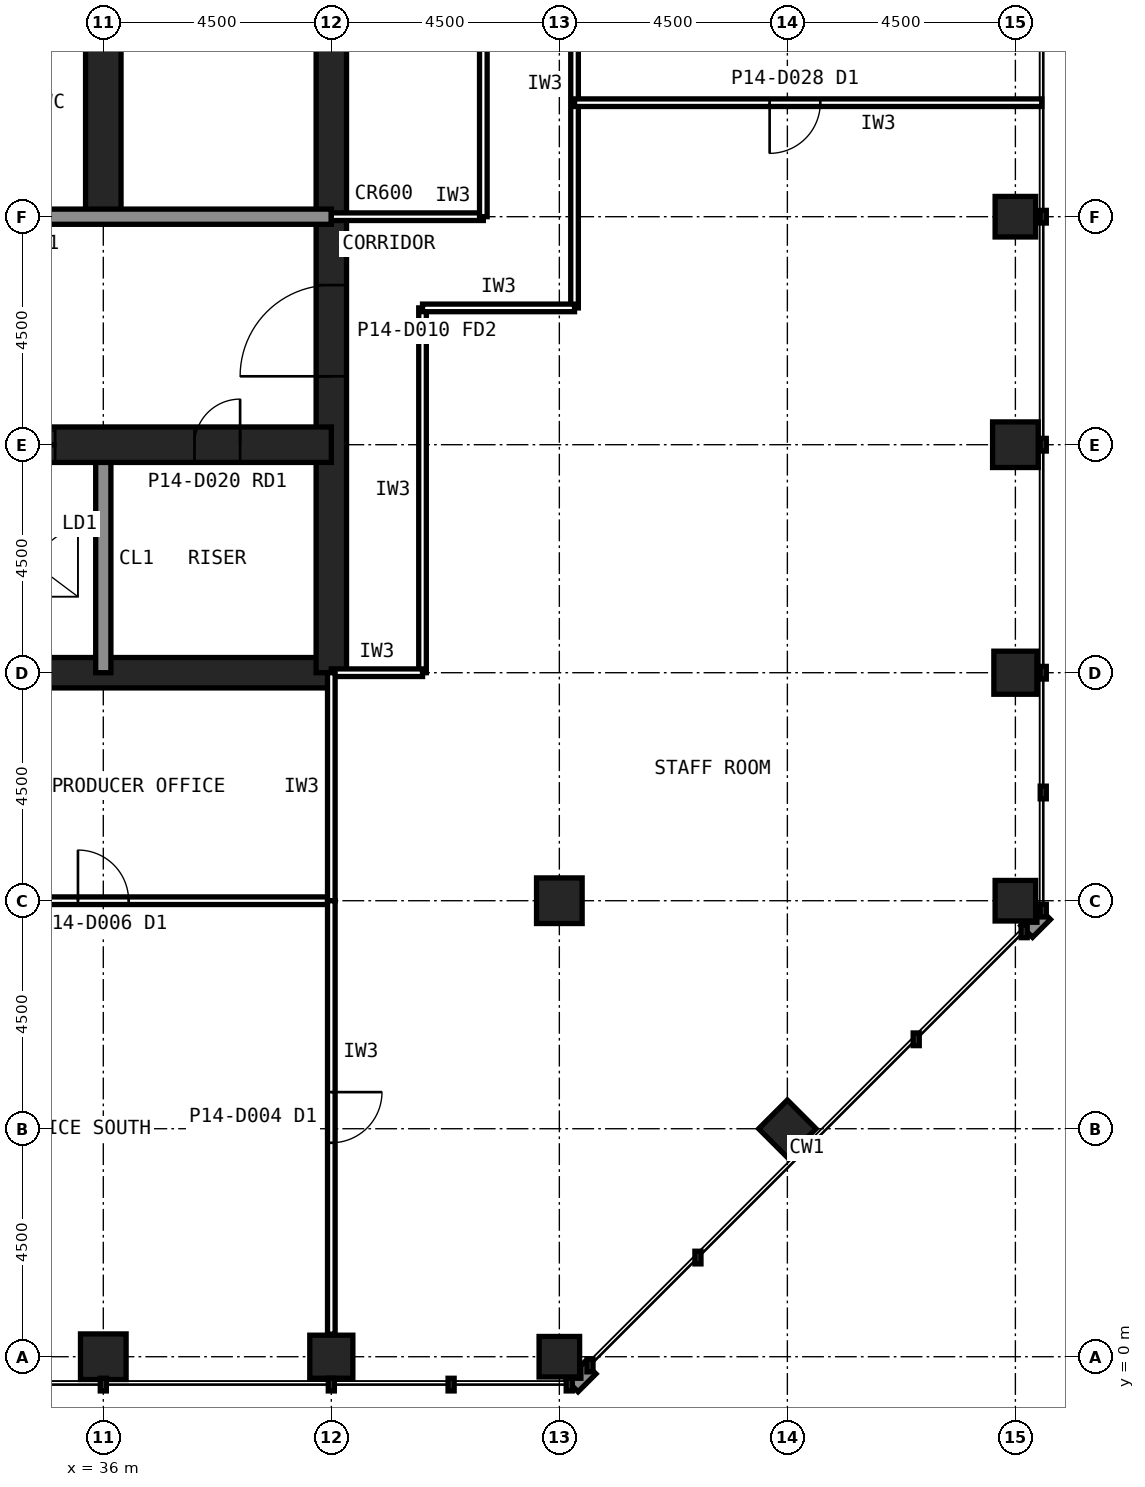
"""IFC4 building model, lengths in metres.
Left out: names, types, materials, properties, quantities, classifications, styles, units other than length and angle.
Written with IfcOpenShell. Run it as: python <this file> out.ifc"""

import sys

from ifc_helpers import new_model, si_unit, direction, frame, frame_2d, origin, origin_2d, place, context, subcontext, project, spatial, rectangle, hollow_rectangle, extrude, element, fill, save


model = new_model("IFC4")
c1 = context("Model", 3, precision=1e-05, world=origin(), true_north=direction((0.0, 1.0)))
c2 = subcontext(c1, "Body", "Model", "MODEL_VIEW")
j1 = project(units=[si_unit("LENGTHUNIT", "METRE"), si_unit("PLANEANGLEUNIT", "RADIAN")], contexts=[c1])
p1 = place(None, origin())
s1 = spatial("IfcSite", under=j1, at=p1, CompositionType="ELEMENT")
p2 = place(p1, origin())
s2 = spatial("IfcBuilding", under=s1, at=p2, CompositionType="ELEMENT")
p3 = place(p2, frame((0.0, 0.0, 62.6)))
s3 = spatial("IfcBuildingStorey", under=s2, at=p3, CompositionType="ELEMENT", Elevation=62.6)
p4 = place(p3, frame((36.0, 0.0, 0.0), z_axis=(0.0, 0.0, 1.0), x_axis=(1.0, 0.0, 0.0)))
e1 = element("IfcColumn", 1, at=p4, inside=s3, PredefinedType="COLUMN", context=c2, shape_type="SweptSolid", body=[
    extrude(hollow_rectangle(XDim=0.9, YDim=0.9, WallThickness=0.063, at=origin_2d()), origin(), (0.0, 0.0, 1.0), 4.2),
])
p5 = place(p3, frame((40.5, 0.0, 0.0), z_axis=(0.0, 0.0, 1.0), x_axis=(1.0, 0.0, 0.0)))
e2 = element("IfcColumn", 2, at=p5, inside=s3, PredefinedType="COLUMN", context=c2, shape_type="SweptSolid", body=[
    extrude(hollow_rectangle(XDim=0.85, YDim=0.85, WallThickness=0.05, at=origin_2d()), origin(), (0.0, 0.0, 1.0), 4.2),
])
for number, where, z_axis, x_axis in (
    (3, (45.0, 0.0, 0.0), (0.0, 0.0, 1.0), (1.0, 0.0, 0.0)),
    (4, (54.0, 9.0, 0.0), (0.0, 0.0, 1.0), (1.0, 0.0, 0.0)),
):
    element("IfcColumn", number, at=place(p3, frame(where, z_axis=z_axis, x_axis=x_axis)), inside=s3, PredefinedType="COLUMN", context=c2, shape_type="SweptSolid", body=[
        extrude(hollow_rectangle(XDim=0.8, YDim=0.8, WallThickness=0.045, at=origin_2d()), origin(), (0.0, 0.0, 1.0), 4.2),
    ])
p6 = place(p3, frame((54.0, 13.5, 0.0), z_axis=(0.0, 0.0, 1.0), x_axis=(1.0, 0.0, 0.0)))
e5 = element("IfcColumn", 5, at=p6, inside=s3, PredefinedType="COLUMN", context=c2, shape_type="SweptSolid", body=[
    extrude(hollow_rectangle(XDim=0.85, YDim=0.85, WallThickness=0.05, at=origin_2d()), origin(), (0.0, 0.0, 1.0), 4.2),
])
p7 = place(p3, frame((54.0, 18.0, 0.0), z_axis=(0.0, 0.0, 1.0), x_axis=(1.0, 0.0, 0.0)))
e6 = element("IfcColumn", 6, at=p7, inside=s3, PredefinedType="COLUMN", context=c2, shape_type="SweptSolid", body=[
    extrude(hollow_rectangle(XDim=0.9, YDim=0.9, WallThickness=0.063, at=origin_2d()), origin(), (0.0, 0.0, 1.0), 4.2),
])
for number, where, z_axis, x_axis in (
    (7, (54.0, 22.5, 0.0), (0.0, 0.0, 1.0), (1.0, 0.0, 0.0)),
    (8, (49.5, 4.5, 0.0), (0.0, 0.0, 1.0), (0.707, 0.707, 0.0)),
):
    element("IfcColumn", number, at=place(p3, frame(where, z_axis=z_axis, x_axis=x_axis)), inside=s3, PredefinedType="COLUMN", context=c2, shape_type="SweptSolid", body=[
        extrude(hollow_rectangle(XDim=0.8, YDim=0.8, WallThickness=0.045, at=origin_2d()), origin(), (0.0, 0.0, 1.0), 4.2),
    ])
p8 = place(p3, frame((45.0, 9.0, 0.0), z_axis=(0.0, 0.0, 1.0), x_axis=(1.0, 0.0, 0.0)))
e9 = element("IfcColumn", 9, at=p8, inside=s3, PredefinedType="COLUMN", context=c2, shape_type="SweptSolid", body=[
    extrude(hollow_rectangle(XDim=0.9, YDim=0.9, WallThickness=0.063, at=origin_2d()), origin(), (0.0, 0.0, 1.0), 4.2),
])
p9 = place(p3, frame((13.5, 13.5, 0.0), z_axis=(0.0, 0.0, 1.0), x_axis=(1.0, 0.0, 0.0)))
e10 = element("IfcWall", 10, at=p9, inside=s3, PredefinedType="SHEAR", context=c2, shape_type="SweptSolid", body=[
    extrude(rectangle(XDim=27.0, YDim=0.6, at=frame_2d((13.5, 0.0))), origin(), (0.0, 0.0, 1.0), 4.2),
])
p10 = place(p3, frame((40.5, 13.5, 0.0), z_axis=(0.0, 0.0, 1.0), x_axis=(0.0, 1.0, 0.0)))
e11 = element("IfcWall", 11, at=p10, inside=s3, PredefinedType="SHEAR", context=c2, shape_type="SweptSolid", body=[
    extrude(rectangle(XDim=27.0, YDim=0.6, at=frame_2d((13.5, 0.0))), origin(), (0.0, 0.0, 1.0), 4.2),
])
p11 = place(p10, frame((5.85, 0.0, 0.0)))
e12 = element("IfcOpeningElement", 12, at=p11, cuts=e11, PredefinedType="OPENING", context=c2, shape_type="SweptSolid", body=[
    extrude(rectangle(XDim=1.8, YDim=2.1, at=frame_2d((0.9, 1.05))), frame((0.0, 0.31, 0.0), z_axis=(0.0, -1.0, 0.0), x_axis=(1.0, 0.0, 0.0)), (0.0, 0.0, 1.0), 0.62),
])
p12 = place(p10, frame((19.65, 0.0, 0.0)))
e13 = element("IfcOpeningElement", 13, at=p12, cuts=e11, PredefinedType="OPENING", context=c2, shape_type="SweptSolid", body=[
    extrude(rectangle(XDim=1.2, YDim=2.1, at=frame_2d((0.6, 1.05))), frame((0.0, 0.31, 0.0), z_axis=(0.0, -1.0, 0.0), x_axis=(1.0, 0.0, 0.0)), (0.0, 0.0, 1.0), 0.62),
])
p13 = place(p3, frame((36.0, 13.5, 0.0), z_axis=(0.0, 0.0, 1.0), x_axis=(0.0, 1.0, 0.0)))
e14 = element("IfcWall", 14, at=p13, inside=s3, PredefinedType="SOLIDWALL", context=c2, shape_type="SweptSolid", body=[
    extrude(rectangle(XDim=4.5, YDim=0.3, at=frame_2d((2.25, 0.0))), origin(), (0.0, 0.0, 1.0), 4.04),
])
p14 = place(p3, frame((36.0, 22.5, 0.0), z_axis=(0.0, 0.0, 1.0), x_axis=(0.0, 1.0, 0.0)))
e15 = element("IfcWall", 15, at=p14, inside=s3, PredefinedType="SHEAR", context=c2, shape_type="SweptSolid", body=[
    extrude(rectangle(XDim=18.0, YDim=0.7, at=frame_2d((9.0, 0.0))), origin(), (0.0, 0.0, 1.0), 4.2),
])
p15 = place(p3, frame((13.5, 18.0, 0.0), z_axis=(0.0, 0.0, 1.0), x_axis=(1.0, 0.0, 0.0)))
e16 = element("IfcWall", 16, at=p15, inside=s3, PredefinedType="SHEAR", context=c2, shape_type="SweptSolid", body=[
    extrude(rectangle(XDim=27.0, YDim=0.7, at=frame_2d((13.5, 0.0))), origin(), (0.0, 0.0, 1.0), 4.2),
])
p16 = place(p15, frame((24.3, 0.0, 0.0)))
e17 = element("IfcOpeningElement", 17, at=p16, cuts=e16, PredefinedType="OPENING", context=c2, shape_type="SweptSolid", body=[
    extrude(rectangle(XDim=0.9, YDim=2.1, at=frame_2d((0.45, 1.05))), frame((0.0, 0.36, 0.0), z_axis=(0.0, -1.0, 0.0), x_axis=(1.0, 0.0, 0.0)), (0.0, 0.0, 1.0), 0.72),
])
p17 = place(p15, frame((5.45, 0.0, 0.0)))
e18 = element("IfcOpeningElement", 18, at=p17, cuts=e16, PredefinedType="OPENING", context=c2, shape_type="SweptSolid", body=[
    extrude(rectangle(XDim=1.1, YDim=2.1, at=frame_2d((0.55, 1.05))), frame((0.0, 0.36, 0.0), z_axis=(0.0, -1.0, 0.0), x_axis=(1.0, 0.0, 0.0)), (0.0, 0.0, 1.0), 0.72),
])
p18 = place(p15, frame((8.45, 0.0, 0.0)))
e19 = element("IfcOpeningElement", 19, at=p18, cuts=e16, PredefinedType="OPENING", context=c2, shape_type="SweptSolid", body=[
    extrude(rectangle(XDim=1.1, YDim=2.1, at=frame_2d((0.55, 1.05))), frame((0.0, 0.36, 0.0), z_axis=(0.0, -1.0, 0.0), x_axis=(1.0, 0.0, 0.0)), (0.0, 0.0, 1.0), 0.72),
])
p19 = place(p15, frame((11.45, 0.0, 0.0)))
e20 = element("IfcOpeningElement", 20, at=p19, cuts=e16, PredefinedType="OPENING", context=c2, shape_type="SweptSolid", body=[
    extrude(rectangle(XDim=1.1, YDim=2.1, at=frame_2d((0.55, 1.05))), frame((0.0, 0.36, 0.0), z_axis=(0.0, -1.0, 0.0), x_axis=(1.0, 0.0, 0.0)), (0.0, 0.0, 1.0), 0.72),
])
p20 = place(p15, frame((14.45, 0.0, 0.0)))
e21 = element("IfcOpeningElement", 21, at=p20, cuts=e16, PredefinedType="OPENING", context=c2, shape_type="SweptSolid", body=[
    extrude(rectangle(XDim=1.1, YDim=2.1, at=frame_2d((0.55, 1.05))), frame((0.0, 0.36, 0.0), z_axis=(0.0, -1.0, 0.0), x_axis=(1.0, 0.0, 0.0)), (0.0, 0.0, 1.0), 0.72),
])
p21 = place(p15, frame((17.45, 0.0, 0.0)))
e22 = element("IfcOpeningElement", 22, at=p21, cuts=e16, PredefinedType="OPENING", context=c2, shape_type="SweptSolid", body=[
    extrude(rectangle(XDim=1.1, YDim=2.1, at=frame_2d((0.55, 1.05))), frame((0.0, 0.36, 0.0), z_axis=(0.0, -1.0, 0.0), x_axis=(1.0, 0.0, 0.0)), (0.0, 0.0, 1.0), 0.72),
])
p22 = place(p15, frame((20.45, 0.0, 0.0)))
e23 = element("IfcOpeningElement", 23, at=p22, cuts=e16, PredefinedType="OPENING", context=c2, shape_type="SweptSolid", body=[
    extrude(rectangle(XDim=1.1, YDim=2.1, at=frame_2d((0.55, 1.05))), frame((0.0, 0.36, 0.0), z_axis=(0.0, -1.0, 0.0), x_axis=(1.0, 0.0, 0.0)), (0.0, 0.0, 1.0), 0.72),
])
p23 = place(p15, frame((1.6, 0.0, 0.0)))
e24 = element("IfcOpeningElement", 24, at=p23, cuts=e16, PredefinedType="OPENING", context=c2, shape_type="SweptSolid", body=[
    extrude(rectangle(XDim=1.3, YDim=2.2, at=frame_2d((0.65, 1.1))), frame((0.0, 0.36, 0.0), z_axis=(0.0, -1.0, 0.0), x_axis=(1.0, 0.0, 0.0)), (0.0, 0.0, 1.0), 0.72),
])
p24 = place(p3, frame((13.5, 22.5, 0.0), z_axis=(0.0, 0.0, 1.0), x_axis=(1.0, 0.0, 0.0)))
e25 = element("IfcWall", 25, at=p24, inside=s3, PredefinedType="SOLIDWALL", context=c2, shape_type="SweptSolid", body=[
    extrude(rectangle(XDim=27.0, YDim=0.3, at=frame_2d((13.5, 0.0))), origin(), (0.0, 0.0, 1.0), 4.04),
])
p25 = place(p24, frame((1.65, 0.0, 0.0)))
e26 = element("IfcOpeningElement", 26, at=p25, cuts=e25, PredefinedType="OPENING", context=c2, shape_type="SweptSolid", body=[
    extrude(rectangle(XDim=1.2, YDim=2.1, at=frame_2d((0.6, 1.05))), frame((0.0, 0.16, 0.0), z_axis=(0.0, -1.0, 0.0), x_axis=(1.0, 0.0, 0.0)), (0.0, 0.0, 1.0), 0.32),
])
p26 = place(p24, frame((6.025, 0.0, 0.0)))
e27 = element("IfcOpeningElement", 27, at=p26, cuts=e25, PredefinedType="OPENING", context=c2, shape_type="SweptSolid", body=[
    extrude(rectangle(XDim=1.0, YDim=2.1, at=frame_2d((0.5, 1.05))), frame((0.0, 0.16, 0.0), z_axis=(0.0, -1.0, 0.0), x_axis=(1.0, 0.0, 0.0)), (0.0, 0.0, 1.0), 0.32),
])
p27 = place(p24, frame((10.525, 0.0, 0.0)))
e28 = element("IfcOpeningElement", 28, at=p27, cuts=e25, PredefinedType="OPENING", context=c2, shape_type="SweptSolid", body=[
    extrude(rectangle(XDim=1.0, YDim=2.1, at=frame_2d((0.5, 1.05))), frame((0.0, 0.16, 0.0), z_axis=(0.0, -1.0, 0.0), x_axis=(1.0, 0.0, 0.0)), (0.0, 0.0, 1.0), 0.32),
])
p28 = place(p24, frame((19.75, 0.0, 0.0)))
e29 = element("IfcOpeningElement", 29, at=p28, cuts=e25, PredefinedType="OPENING", context=c2, shape_type="SweptSolid", body=[
    extrude(rectangle(XDim=1.0, YDim=2.1, at=frame_2d((0.5, 1.05))), frame((0.0, 0.16, 0.0), z_axis=(0.0, -1.0, 0.0), x_axis=(1.0, 0.0, 0.0)), (0.0, 0.0, 1.0), 0.32),
])
p29 = place(p24, frame((15.05, 0.0, 0.0)))
e30 = element("IfcOpeningElement", 30, at=p29, cuts=e25, PredefinedType="OPENING", context=c2, shape_type="SweptSolid", body=[
    extrude(rectangle(XDim=1.4, YDim=2.4, at=frame_2d((0.7, 1.2))), frame((0.0, 0.16, 0.0), z_axis=(0.0, -1.0, 0.0), x_axis=(1.0, 0.0, 0.0)), (0.0, 0.0, 1.0), 0.32),
])
p30 = place(p3, frame((45.3, 20.7, 0.0), z_axis=(0.0, 0.0, 1.0), x_axis=(0.0, 1.0, 0.0)))
e31 = element("IfcWall", 31, at=p30, inside=s3, PredefinedType="PARTITIONING", context=c2, shape_type="SweptSolid", body=[
    extrude(rectangle(XDim=12.6, YDim=0.15, at=frame_2d((6.3, 0.0))), origin(), (0.0, 0.0, 1.0), 4.04),
])
p31 = place(p30, frame((5.8, 0.0, 0.0)))
e32 = element("IfcOpeningElement", 32, at=p31, cuts=e31, PredefinedType="OPENING", context=c2, shape_type="SweptSolid", body=[
    extrude(rectangle(XDim=1.0, YDim=2.1, at=frame_2d((0.5, 1.05))), frame((0.0, 0.085, 0.0), z_axis=(0.0, -1.0, 0.0), x_axis=(1.0, 0.0, 0.0)), (0.0, 0.0, 1.0), 0.17),
])
p32 = place(p3, frame((42.3, 13.5, 0.0), z_axis=(0.0, 0.0, 1.0), x_axis=(0.0, 1.0, 0.0)))
e33 = element("IfcWall", 33, at=p32, inside=s3, PredefinedType="PARTITIONING", context=c2, shape_type="SweptSolid", body=[
    extrude(rectangle(XDim=7.2, YDim=0.15, at=frame_2d((3.6, 0.0))), origin(), (0.0, 0.0, 1.0), 4.04),
])
p33 = place(p3, frame((42.3, 20.7, 0.0), z_axis=(0.0, 0.0, 1.0), x_axis=(1.0, 0.0, 0.0)))
e34 = element("IfcWall", 34, at=p33, inside=s3, PredefinedType="PARTITIONING", context=c2, shape_type="SweptSolid", body=[
    extrude(rectangle(XDim=3.0, YDim=0.15, at=frame_2d((1.5, 0.0))), origin(), (0.0, 0.0, 1.0), 4.04),
])
p34 = place(p3, frame((40.5, 13.5, 0.0), z_axis=(0.0, 0.0, 1.0), x_axis=(1.0, 0.0, 0.0)))
e35 = element("IfcWall", 35, at=p34, inside=s3, PredefinedType="PARTITIONING", context=c2, shape_type="SweptSolid", body=[
    extrude(rectangle(XDim=1.8, YDim=0.15, at=frame_2d((0.9, 0.0))), origin(), (0.0, 0.0, 1.0), 3.189),
])
p35 = place(p3, frame((31.5, 9.0, 0.0), z_axis=(0.0, 0.0, 1.0), x_axis=(1.0, 0.0, 0.0)))
e36 = element("IfcWall", 36, at=p35, inside=s3, PredefinedType="PARTITIONING", context=c2, shape_type="SweptSolid", body=[
    extrude(rectangle(XDim=9.0, YDim=0.15, at=frame_2d((4.5, 0.0))), origin(), (0.0, 0.0, 1.0), 4.04),
])
p36 = place(p35, frame((4.0, 0.0, 0.0)))
e37 = element("IfcOpeningElement", 37, at=p36, cuts=e36, PredefinedType="OPENING", context=c2, shape_type="SweptSolid", body=[
    extrude(rectangle(XDim=1.0, YDim=2.1, at=frame_2d((0.5, 1.05))), frame((0.0, 0.085, 0.0), z_axis=(0.0, -1.0, 0.0), x_axis=(1.0, 0.0, 0.0)), (0.0, 0.0, 1.0), 0.17),
])
p37 = place(p3, frame((40.5, 9.0, 0.0), z_axis=(0.0, 0.0, 1.0), x_axis=(0.0, 1.0, 0.0)))
e38 = element("IfcWall", 38, at=p37, inside=s3, PredefinedType="PARTITIONING", context=c2, shape_type="SweptSolid", body=[
    extrude(rectangle(XDim=4.5, YDim=0.15, at=frame_2d((2.25, 0.0))), origin(), (0.0, 0.0, 1.0), 3.189),
])
p38 = place(p3, frame((40.5, 22.5, 0.0), z_axis=(0.0, 0.0, 1.0), x_axis=(1.0, 0.0, 0.0)))
e39 = element("IfcWall", 39, at=p38, inside=s3, PredefinedType="PARTITIONING", context=c2, shape_type="SweptSolid", body=[
    extrude(rectangle(XDim=3.0, YDim=0.15, at=frame_2d((1.5, 0.0))), origin(), (0.0, 0.0, 1.0), 3.189),
])
p39 = place(p3, frame((43.5, 22.5, 0.0), z_axis=(0.0, 0.0, 1.0), x_axis=(0.0, 1.0, 0.0)))
e40 = element("IfcWall", 40, at=p39, inside=s3, PredefinedType="PARTITIONING", context=c2, shape_type="SweptSolid", body=[
    extrude(rectangle(XDim=9.0, YDim=0.15, at=frame_2d((4.5, 0.0))), origin(), (0.0, 0.0, 1.0), 4.04),
])
p40 = place(p3, frame((54.52, 24.75, 0.0), z_axis=(0.0, 0.0, 1.0), x_axis=(-1.0, 0.0, 0.0)))
e41 = element("IfcWall", 41, at=p40, inside=s3, PredefinedType="PARTITIONING", context=c2, shape_type="SweptSolid", body=[
    extrude(rectangle(XDim=9.22, YDim=0.15, at=frame_2d((4.61, 0.0))), origin(), (0.0, 0.0, 1.0), 4.04),
])
p41 = place(p40, frame((4.37, 0.0, 0.0)))
e42 = element("IfcOpeningElement", 42, at=p41, cuts=e41, PredefinedType="OPENING", context=c2, shape_type="SweptSolid", body=[
    extrude(rectangle(XDim=1.0, YDim=2.1, at=frame_2d((0.5, 1.05))), frame((0.0, 0.085, 0.0), z_axis=(0.0, -1.0, 0.0), x_axis=(1.0, 0.0, 0.0)), (0.0, 0.0, 1.0), 0.17),
])
p42 = place(p3, frame((40.5, 9.0, 0.0), z_axis=(0.0, 0.0, 1.0), x_axis=(0.0, -1.0, 0.0)))
e43 = element("IfcWall", 43, at=p42, inside=s3, PredefinedType="PARTITIONING", context=c2, shape_type="SweptSolid", body=[
    extrude(rectangle(XDim=8.555, YDim=0.15, at=frame_2d((4.277, 0.0))), origin(), (0.0, 0.0, 1.0), 3.189),
])
p43 = place(p42, frame((3.778, 0.0, 0.0)))
e44 = element("IfcOpeningElement", 44, at=p43, cuts=e43, PredefinedType="OPENING", context=c2, shape_type="SweptSolid", body=[
    extrude(rectangle(XDim=1.0, YDim=2.1, at=frame_2d((0.5, 1.05))), frame((0.0, 0.085, 0.0), z_axis=(0.0, -1.0, 0.0), x_axis=(1.0, 0.0, 0.0)), (0.0, 0.0, 1.0), 0.17),
])
p44 = place(p11, origin())
e45 = element("IfcDoor", 45, at=p44, inside=s3, OperationType="SINGLE_SWING_LEFT", PredefinedType="DOOR", context=c2, shape_type="SweptSolid", body=[
    extrude(rectangle(XDim=1.8, YDim=2.1, at=frame_2d((0.9, 1.05))), frame((0.0, 0.025, 0.0), z_axis=(0.0, -1.0, 0.0), x_axis=(1.0, 0.0, 0.0)), (0.0, 0.0, 1.0), 0.05),
])
fill(e12, e45)
p45 = place(p16, origin())
e46 = element("IfcDoor", 46, at=p45, inside=s3, OperationType="SINGLE_SWING_RIGHT", PredefinedType="DOOR", context=c2, shape_type="SweptSolid", body=[
    extrude(rectangle(XDim=0.9, YDim=2.1, at=frame_2d((0.45, 1.05))), frame((0.0, 0.025, 0.0), z_axis=(0.0, -1.0, 0.0), x_axis=(1.0, 0.0, 0.0)), (0.0, 0.0, 1.0), 0.05),
])
fill(e17, e46)
p46 = place(p22, origin())
e47 = element("IfcDoor", 47, at=p46, inside=s3, OperationType="SLIDING_TO_LEFT", PredefinedType="DOOR", context=c2, shape_type="SweptSolid", body=[
    extrude(rectangle(XDim=1.1, YDim=2.1, at=frame_2d((0.55, 1.05))), frame((0.0, 0.025, 0.0), z_axis=(0.0, -1.0, 0.0), x_axis=(1.0, 0.0, 0.0)), (0.0, 0.0, 1.0), 0.05),
])
fill(e23, e47)
p47 = place(p36, origin())
e48 = element("IfcDoor", 48, at=p47, inside=s3, OperationType="SINGLE_SWING_LEFT", PredefinedType="DOOR", context=c2, shape_type="SweptSolid", body=[
    extrude(rectangle(XDim=1.0, YDim=2.1, at=frame_2d((0.5, 1.05))), frame((0.0, 0.025, 0.0), z_axis=(0.0, -1.0, 0.0), x_axis=(1.0, 0.0, 0.0)), (0.0, 0.0, 1.0), 0.05),
])
fill(e37, e48)
p48 = place(p41, origin())
e49 = element("IfcDoor", 49, at=p48, inside=s3, OperationType="SINGLE_SWING_RIGHT", PredefinedType="DOOR", context=c2, shape_type="SweptSolid", body=[
    extrude(rectangle(XDim=1.0, YDim=2.1, at=frame_2d((0.5, 1.05))), frame((0.0, 0.025, 0.0), z_axis=(0.0, -1.0, 0.0), x_axis=(1.0, 0.0, 0.0)), (0.0, 0.0, 1.0), 0.05),
])
fill(e42, e49)
p49 = place(p43, origin())
e50 = element("IfcDoor", 50, at=p49, inside=s3, OperationType="SINGLE_SWING_LEFT", PredefinedType="DOOR", context=c2, shape_type="SweptSolid", body=[
    extrude(rectangle(XDim=1.0, YDim=2.1, at=frame_2d((0.5, 1.05))), frame((0.0, 0.025, 0.0), z_axis=(0.0, -1.0, 0.0), x_axis=(1.0, 0.0, 0.0)), (0.0, 0.0, 1.0), 0.05),
])
fill(e44, e50)
save(model, sys.argv[1])
